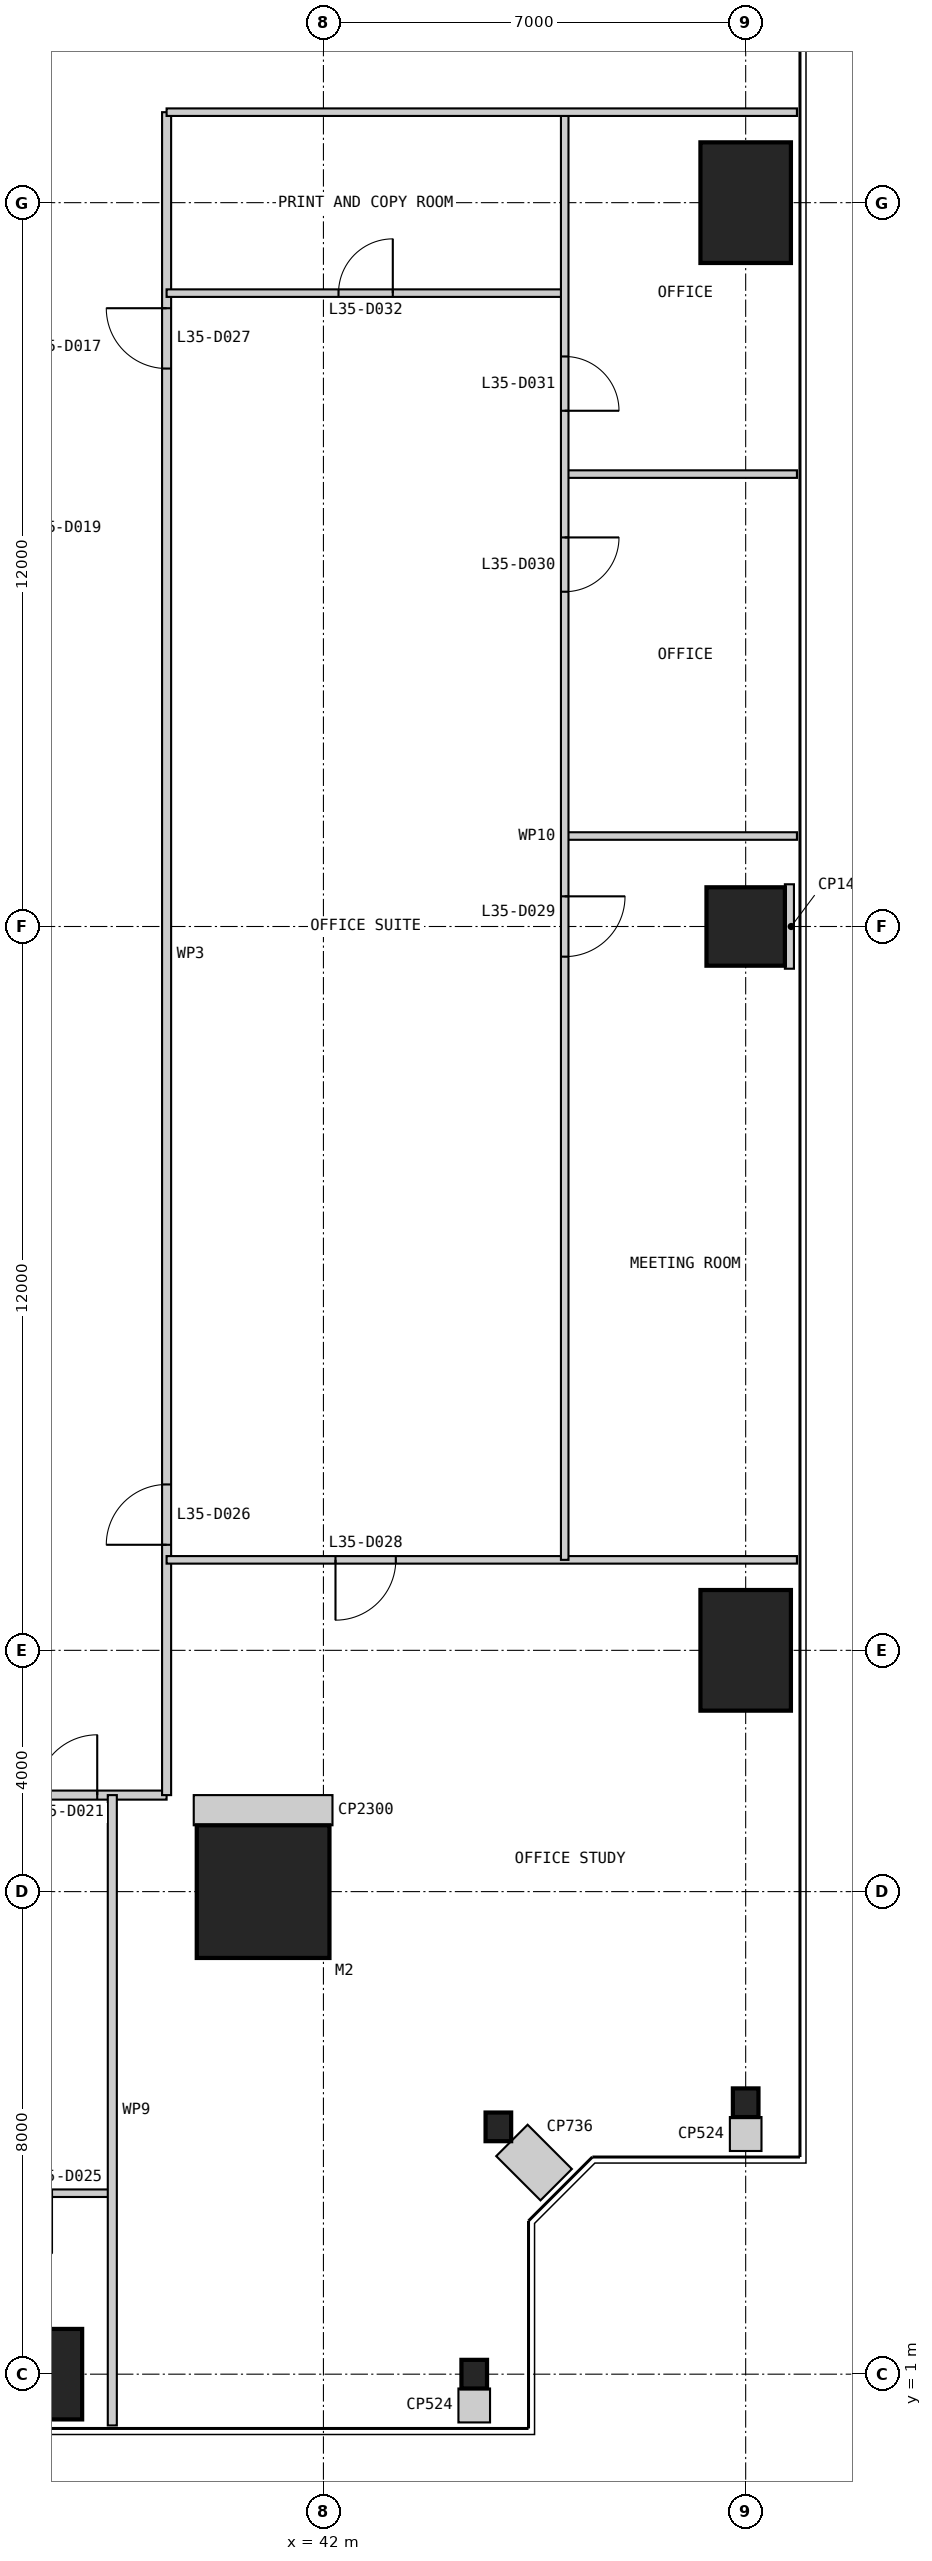
"""IFC4 building model, lengths in metres.
Left out: names, types, materials, properties, quantities, classifications, styles, units other than length and angle.
Written with IfcOpenShell. Run it as: python <this file> out.ifc"""

import sys

from ifc_helpers import new_model, si_unit, direction, frame, frame_2d, origin, origin_2d, place, context, subcontext, project, spatial, rectangle, i_section, extrude, element, fill, save


model = new_model("IFC4")
c1 = context("Model", 3, precision=1e-05, world=origin(), true_north=direction((0.0, 1.0)))
c2 = subcontext(c1, "Body", "Model", "MODEL_VIEW")
j1 = project(units=[si_unit("LENGTHUNIT", "METRE"), si_unit("PLANEANGLEUNIT", "RADIAN")], contexts=[c1])
p1 = place(None, origin())
s1 = spatial("IfcSite", under=j1, at=p1, CompositionType="ELEMENT")
p2 = place(p1, origin())
s2 = spatial("IfcBuilding", under=s1, at=p2, CompositionType="ELEMENT")
p3 = place(p2, frame((0.0, 0.0, 150.4)))
s3 = spatial("IfcBuildingStorey", under=s2, at=p3, CompositionType="ELEMENT", Elevation=150.4)
p4 = place(p3, frame((41.0, 9.0, 0.0), z_axis=(0.0, 0.0, 1.0), x_axis=(1.0, 0.0, 0.0)))
e1 = element("IfcColumn", 1, at=p4, inside=s3, PredefinedType="COLUMN", context=c2, shape_type="SweptSolid", body=[
    extrude(rectangle(XDim=2.2, YDim=2.2, at=origin_2d()), origin(), (0.0, 0.0, 1.0), 4.0),
])
p5 = place(p3, frame((37.0, 1.0, 0.0), z_axis=(0.0, 0.0, 1.0), x_axis=(1.0, 0.0, 0.0)))
e2 = element("IfcColumn", 2, at=p5, inside=s3, PredefinedType="COLUMN", context=c2, shape_type="SweptSolid", body=[
    extrude(rectangle(XDim=2.0, YDim=1.5, at=origin_2d()), origin(), (0.0, 0.0, 1.0), 4.0),
])
for number, where, z_axis, x_axis in (
    (3, (44.5, 1.0, 0.0), (0.0, 0.0, 1.0), (1.0, 0.0, 0.0)),
    (4, (44.9, 5.1, 0.0), (0.0, 0.0, 1.0), (1.0, 0.0, 0.0)),
    (5, (49.0, 5.5, 0.0), (0.0, 0.0, 1.0), (1.0, 0.0, 0.0)),
):
    element("IfcColumn", number, at=place(p3, frame(where, z_axis=z_axis, x_axis=x_axis)), inside=s3, PredefinedType="COLUMN", context=c2, shape_type="SweptSolid", body=[
        extrude(i_section(OverallWidth=0.424, OverallDepth=0.475, WebThickness=0.048, FlangeThickness=0.077, at=origin_2d()), origin(), (0.0, 0.0, 1.0), 4.0),
    ])
p6 = place(p3, frame((49.0, 13.0, 0.0), z_axis=(0.0, 0.0, 1.0), x_axis=(1.0, 0.0, 0.0)))
e6 = element("IfcColumn", 6, at=p6, inside=s3, PredefinedType="COLUMN", context=c2, shape_type="SweptSolid", body=[
    extrude(rectangle(XDim=1.5, YDim=2.0, at=origin_2d()), origin(), (0.0, 0.0, 1.0), 4.0),
])
p7 = place(p3, frame((49.0, 25.0, 0.0), z_axis=(0.0, 0.0, 1.0), x_axis=(1.0, 0.0, 0.0)))
e7 = element("IfcColumn", 7, at=p7, inside=s3, PredefinedType="COLUMN", context=c2, shape_type="SweptSolid", body=[
    extrude(rectangle(XDim=1.3, YDim=1.3, at=origin_2d()), origin(), (0.0, 0.0, 1.0), 4.0),
])
p8 = place(p3, frame((49.0, 37.0, 0.0), z_axis=(0.0, 0.0, 1.0), x_axis=(1.0, 0.0, 0.0)))
e8 = element("IfcColumn", 8, at=p8, inside=s3, PredefinedType="COLUMN", context=c2, shape_type="SweptSolid", body=[
    extrude(rectangle(XDim=1.5, YDim=2.0, at=origin_2d()), origin(), (0.0, 0.0, 1.0), 4.0),
])
p9 = place(p3, frame((10.6, 10.6, 0.0), z_axis=(0.0, 0.0, 1.0), x_axis=(1.0, 0.0, 0.0)))
e9 = element("IfcWall", 9, at=p9, inside=s3, PredefinedType="PARTITIONING", context=c2, shape_type="SweptSolid", body=[
    extrude(rectangle(XDim=28.8, YDim=0.15, at=frame_2d((14.4, 0.0))), origin(), (0.0, 0.0, 1.0), 3.85),
])
p10 = place(p9, frame((4.15, 0.0, 0.0)))
e10 = element("IfcOpeningElement", 10, at=p10, cuts=e9, PredefinedType="OPENING", context=c2, shape_type="SweptSolid", body=[
    extrude(rectangle(XDim=1.0, YDim=2.2, at=frame_2d((0.5, 1.1))), frame((0.0, 0.085, 0.0), z_axis=(0.0, -1.0, 0.0), x_axis=(1.0, 0.0, 0.0)), (0.0, 0.0, 1.0), 0.17),
])
p11 = place(p9, frame((26.65, 0.0, 0.0)))
e11 = element("IfcOpeningElement", 11, at=p11, cuts=e9, PredefinedType="OPENING", context=c2, shape_type="SweptSolid", body=[
    extrude(rectangle(XDim=1.0, YDim=2.2, at=frame_2d((0.5, 1.1))), frame((0.0, 0.085, 0.0), z_axis=(0.0, -1.0, 0.0), x_axis=(1.0, 0.0, 0.0)), (0.0, 0.0, 1.0), 0.17),
])
p12 = place(p3, frame((14.5, 4.0, 0.0), z_axis=(0.0, 0.0, 1.0), x_axis=(1.0, 0.0, 0.0)))
e12 = element("IfcWall", 12, at=p12, inside=s3, PredefinedType="PARTITIONING", context=c2, shape_type="SweptSolid", body=[
    extrude(rectangle(XDim=24.0, YDim=0.125, at=frame_2d((12.0, 0.0))), origin(), (0.0, 0.0, 1.0), 3.85),
])
p13 = place(p12, frame((4.05, 0.0, 0.0)))
e13 = element("IfcOpeningElement", 13, at=p13, cuts=e12, PredefinedType="OPENING", context=c2, shape_type="SweptSolid", body=[
    extrude(rectangle(XDim=0.9, YDim=2.2, at=frame_2d((0.45, 1.1))), frame((0.0, 0.073, 0.0), z_axis=(0.0, -1.0, 0.0), x_axis=(1.0, 0.0, 0.0)), (0.0, 0.0, 1.0), 0.145),
])
p14 = place(p12, frame((10.05, 0.0, 0.0)))
e14 = element("IfcOpeningElement", 14, at=p14, cuts=e12, PredefinedType="OPENING", context=c2, shape_type="SweptSolid", body=[
    extrude(rectangle(XDim=0.9, YDim=2.2, at=frame_2d((0.45, 1.1))), frame((0.0, 0.073, 0.0), z_axis=(0.0, -1.0, 0.0), x_axis=(1.0, 0.0, 0.0)), (0.0, 0.0, 1.0), 0.145),
])
p15 = place(p12, frame((22.0, 0.0, 0.0)))
e15 = element("IfcOpeningElement", 15, at=p15, cuts=e12, PredefinedType="OPENING", context=c2, shape_type="SweptSolid", body=[
    extrude(rectangle(XDim=1.0, YDim=2.2, at=frame_2d((0.5, 1.1))), frame((0.0, 0.073, 0.0), z_axis=(0.0, -1.0, 0.0), x_axis=(1.0, 0.0, 0.0)), (0.0, 0.0, 1.0), 0.145),
])
p16 = place(p3, frame((39.4, 10.6, 0.0), z_axis=(0.0, 0.0, 1.0), x_axis=(0.0, 1.0, 0.0)))
e16 = element("IfcWall", 16, at=p16, inside=s3, PredefinedType="PARTITIONING", context=c2, shape_type="SweptSolid", body=[
    extrude(rectangle(XDim=27.9, YDim=0.15, at=frame_2d((13.95, 0.0))), origin(), (0.0, 0.0, 1.0), 3.85),
])
p17 = place(p16, frame((4.15, 0.0, 0.0)))
e17 = element("IfcOpeningElement", 17, at=p17, cuts=e16, PredefinedType="OPENING", context=c2, shape_type="SweptSolid", body=[
    extrude(rectangle(XDim=1.0, YDim=2.2, at=frame_2d((0.5, 1.1))), frame((0.0, 0.085, 0.0), z_axis=(0.0, -1.0, 0.0), x_axis=(1.0, 0.0, 0.0)), (0.0, 0.0, 1.0), 0.17),
])
p18 = place(p16, frame((23.65, 0.0, 0.0)))
e18 = element("IfcOpeningElement", 18, at=p18, cuts=e16, PredefinedType="OPENING", context=c2, shape_type="SweptSolid", body=[
    extrude(rectangle(XDim=1.0, YDim=2.2, at=frame_2d((0.5, 1.1))), frame((0.0, 0.085, 0.0), z_axis=(0.0, -1.0, 0.0), x_axis=(1.0, 0.0, 0.0)), (0.0, 0.0, 1.0), 0.17),
])
p19 = place(p3, frame((38.5, 0.15, 0.0), z_axis=(0.0, 0.0, 1.0), x_axis=(0.0, 1.0, 0.0)))
e19 = element("IfcWall", 19, at=p19, inside=s3, PredefinedType="PARTITIONING", context=c2, shape_type="SweptSolid", body=[
    extrude(rectangle(XDim=10.45, YDim=0.15, at=frame_2d((5.225, 0.0))), origin(), (0.0, 0.0, 1.0), 3.85),
])
p20 = place(p3, frame((49.85, 14.5, 0.0), z_axis=(0.0, 0.0, 1.0), x_axis=(-1.0, 0.0, 0.0)))
e20 = element("IfcWall", 20, at=p20, inside=s3, PredefinedType="PARTITIONING", context=c2, shape_type="SweptSolid", body=[
    extrude(rectangle(XDim=10.45, YDim=0.125, at=frame_2d((5.225, 0.0))), origin(), (0.0, 0.0, 1.0), 3.85),
])
p21 = place(p20, frame((6.65, 0.0, 0.0)))
e21 = element("IfcOpeningElement", 21, at=p21, cuts=e20, PredefinedType="OPENING", context=c2, shape_type="SweptSolid", body=[
    extrude(rectangle(XDim=1.0, YDim=2.2, at=frame_2d((0.5, 1.1))), frame((0.0, 0.073, 0.0), z_axis=(0.0, -1.0, 0.0), x_axis=(1.0, 0.0, 0.0)), (0.0, 0.0, 1.0), 0.145),
])
for number, where, z_axis, x_axis in (
    (22, (49.85, 26.5, 0.0), (0.0, 0.0, 1.0), (-1.0, 0.0, 0.0)),
    (23, (49.85, 32.5, 0.0), (0.0, 0.0, 1.0), (-1.0, 0.0, 0.0)),
):
    element("IfcWall", number, at=place(p3, frame(where, z_axis=z_axis, x_axis=x_axis)), inside=s3, PredefinedType="PARTITIONING", context=c2, shape_type="SweptSolid", body=[
        extrude(rectangle(XDim=3.85, YDim=0.125, at=frame_2d((1.925, 0.0))), origin(), (0.0, 0.0, 1.0), 3.85),
    ])
p22 = place(p3, frame((46.0, 35.5, 0.0), z_axis=(0.0, 0.0, 1.0), x_axis=(-1.0, 0.0, 0.0)))
e24 = element("IfcWall", 24, at=p22, inside=s3, PredefinedType="PARTITIONING", context=c2, shape_type="SweptSolid", body=[
    extrude(rectangle(XDim=6.6, YDim=0.125, at=frame_2d((3.3, 0.0))), origin(), (0.0, 0.0, 1.0), 3.85),
])
p23 = place(p22, frame((2.85, 0.0, 0.0)))
e25 = element("IfcOpeningElement", 25, at=p23, cuts=e24, PredefinedType="OPENING", context=c2, shape_type="SweptSolid", body=[
    extrude(rectangle(XDim=0.9, YDim=2.2, at=frame_2d((0.45, 1.1))), frame((0.0, 0.073, 0.0), z_axis=(0.0, -1.0, 0.0), x_axis=(1.0, 0.0, 0.0)), (0.0, 0.0, 1.0), 0.145),
])
p24 = place(p3, frame((46.0, 14.5, 0.0), z_axis=(0.0, 0.0, 1.0), x_axis=(0.0, 1.0, 0.0)))
e26 = element("IfcWall", 26, at=p24, inside=s3, PredefinedType="PARTITIONING", context=c2, shape_type="SweptSolid", body=[
    extrude(rectangle(XDim=24.0, YDim=0.125, at=frame_2d((12.0, 0.0))), origin(), (0.0, 0.0, 1.0), 3.238),
])
p25 = place(p24, frame((10.0, 0.0, 0.0)))
e27 = element("IfcOpeningElement", 27, at=p25, cuts=e26, PredefinedType="OPENING", context=c2, shape_type="SweptSolid", body=[
    extrude(rectangle(XDim=1.0, YDim=2.2, at=frame_2d((0.5, 1.1))), frame((0.0, 0.073, 0.0), z_axis=(0.0, -1.0, 0.0), x_axis=(1.0, 0.0, 0.0)), (0.0, 0.0, 1.0), 0.145),
])
p26 = place(p24, frame((16.05, 0.0, 0.0)))
e28 = element("IfcOpeningElement", 28, at=p26, cuts=e26, PredefinedType="OPENING", context=c2, shape_type="SweptSolid", body=[
    extrude(rectangle(XDim=0.9, YDim=2.2, at=frame_2d((0.45, 1.1))), frame((0.0, 0.073, 0.0), z_axis=(0.0, -1.0, 0.0), x_axis=(1.0, 0.0, 0.0)), (0.0, 0.0, 1.0), 0.145),
])
p27 = place(p24, frame((19.05, 0.0, 0.0)))
e29 = element("IfcOpeningElement", 29, at=p27, cuts=e26, PredefinedType="OPENING", context=c2, shape_type="SweptSolid", body=[
    extrude(rectangle(XDim=0.9, YDim=2.2, at=frame_2d((0.45, 1.1))), frame((0.0, 0.073, 0.0), z_axis=(0.0, -1.0, 0.0), x_axis=(1.0, 0.0, 0.0)), (0.0, 0.0, 1.0), 0.145),
])
p28 = place(p3, frame((49.85, 38.5, 0.0), z_axis=(0.0, 0.0, 1.0), x_axis=(-1.0, 0.0, 0.0)))
e30 = element("IfcWall", 30, at=p28, inside=s3, PredefinedType="PARTITIONING", context=c2, shape_type="SweptSolid", body=[
    extrude(rectangle(XDim=10.45, YDim=0.125, at=frame_2d((5.225, 0.0))), origin(), (0.0, 0.0, 1.0), 3.85),
])
p29 = place(p3, frame((41.0, 10.6, 0.0), z_axis=(0.0, 0.0, 1.0), x_axis=(0.0, -1.0, 0.0)))
e31 = element("IfcWall", 31, at=p29, inside=s3, PredefinedType="PARTITIONING", context=c2, shape_type="SweptSolid", body=[
    extrude(rectangle(XDim=0.5, YDim=2.3, at=frame_2d((0.25, 0.0))), origin(), (0.0, 0.0, 1.0), 3.85),
])
p30 = place(p3, frame((44.5, 0.2, 0.0), z_axis=(0.0, 0.0, 1.0), x_axis=(0.0, 1.0, 0.0)))
e32 = element("IfcWall", 32, at=p30, inside=s3, PredefinedType="PARTITIONING", context=c2, shape_type="SweptSolid", body=[
    extrude(rectangle(XDim=0.562, YDim=0.524, at=frame_2d((0.281, 0.0))), origin(), (0.0, 0.0, 1.0), 3.85),
])
p31 = place(p3, frame((45.859, 4.141, 0.0), z_axis=(0.0, 0.0, 1.0), x_axis=(-0.707106781187, 0.707106781187, 0.0)))
e33 = element("IfcWall", 33, at=p31, inside=s3, PredefinedType="PARTITIONING", context=c2, shape_type="SweptSolid", body=[
    extrude(rectangle(XDim=1.038, YDim=0.736, at=frame_2d((0.519, 0.0))), origin(), (0.0, 0.0, 1.0), 3.85),
])
p32 = place(p3, frame((49.0, 4.7, 0.0), z_axis=(0.0, 0.0, 1.0), x_axis=(0.0, 1.0, 0.0)))
e34 = element("IfcWall", 34, at=p32, inside=s3, PredefinedType="PARTITIONING", context=c2, shape_type="SweptSolid", body=[
    extrude(rectangle(XDim=0.562, YDim=0.524, at=frame_2d((0.281, 0.0))), origin(), (0.0, 0.0, 1.0), 3.85),
])
p33 = place(p3, frame((49.8, 25.0, 0.0), z_axis=(0.0, 0.0, 1.0), x_axis=(-1.0, 0.0, 0.0)))
e35 = element("IfcWall", 35, at=p33, inside=s3, PredefinedType="PARTITIONING", context=c2, shape_type="SweptSolid", body=[
    extrude(rectangle(XDim=0.15, YDim=1.4, at=frame_2d((0.075, 0.0))), origin(), (0.0, 0.0, 1.0), 3.85),
])
p34 = place(p11, origin())
e36 = element("IfcDoor", 36, at=p34, inside=s3, OperationType="SINGLE_SWING_RIGHT", PredefinedType="DOOR", context=c2, shape_type="SweptSolid", body=[
    extrude(rectangle(XDim=1.0, YDim=2.2, at=frame_2d((0.5, 1.1))), frame((0.0, 0.025, 0.0), z_axis=(0.0, -1.0, 0.0), x_axis=(1.0, 0.0, 0.0)), (0.0, 0.0, 1.0), 0.05),
])
fill(e11, e36)
p35 = place(p17, origin())
e37 = element("IfcDoor", 37, at=p35, inside=s3, OperationType="SINGLE_SWING_LEFT", PredefinedType="DOOR", context=c2, shape_type="SweptSolid", body=[
    extrude(rectangle(XDim=1.0, YDim=2.2, at=frame_2d((0.5, 1.1))), frame((0.0, 0.025, 0.0), z_axis=(0.0, -1.0, 0.0), x_axis=(1.0, 0.0, 0.0)), (0.0, 0.0, 1.0), 0.05),
])
fill(e17, e37)
p36 = place(p18, origin())
e38 = element("IfcDoor", 38, at=p36, inside=s3, OperationType="SINGLE_SWING_RIGHT", PredefinedType="DOOR", context=c2, shape_type="SweptSolid", body=[
    extrude(rectangle(XDim=1.0, YDim=2.2, at=frame_2d((0.5, 1.1))), frame((0.0, 0.025, 0.0), z_axis=(0.0, -1.0, 0.0), x_axis=(1.0, 0.0, 0.0)), (0.0, 0.0, 1.0), 0.05),
])
fill(e18, e38)
p37 = place(p21, origin())
e39 = element("IfcDoor", 39, at=p37, inside=s3, OperationType="SINGLE_SWING_RIGHT", PredefinedType="DOOR", context=c2, shape_type="SweptSolid", body=[
    extrude(rectangle(XDim=1.0, YDim=2.2, at=frame_2d((0.5, 1.1))), frame((0.0, 0.025, 0.0), z_axis=(0.0, -1.0, 0.0), x_axis=(1.0, 0.0, 0.0)), (0.0, 0.0, 1.0), 0.05),
])
fill(e21, e39)
p38 = place(p25, frame((1.0, 0.0, 0.0), z_axis=(0.0, 0.0, 1.0), x_axis=(-1.0, 0.0, 0.0)))
e40 = element("IfcDoor", 40, at=p38, inside=s3, OperationType="SINGLE_SWING_LEFT", PredefinedType="DOOR", context=c2, shape_type="SweptSolid", body=[
    extrude(rectangle(XDim=1.0, YDim=2.2, at=frame_2d((0.5, 1.1))), frame((0.0, 0.025, 0.0), z_axis=(0.0, -1.0, 0.0), x_axis=(1.0, 0.0, 0.0)), (0.0, 0.0, 1.0), 0.05),
])
fill(e27, e40)
p39 = place(p26, frame((0.9, 0.0, 0.0), z_axis=(0.0, 0.0, 1.0), x_axis=(-1.0, 0.0, 0.0)))
e41 = element("IfcDoor", 41, at=p39, inside=s3, OperationType="SINGLE_SWING_LEFT", PredefinedType="DOOR", context=c2, shape_type="SweptSolid", body=[
    extrude(rectangle(XDim=0.9, YDim=2.2, at=frame_2d((0.45, 1.1))), frame((0.0, 0.025, 0.0), z_axis=(0.0, -1.0, 0.0), x_axis=(1.0, 0.0, 0.0)), (0.0, 0.0, 1.0), 0.05),
])
fill(e28, e41)
p40 = place(p27, frame((0.9, 0.0, 0.0), z_axis=(0.0, 0.0, 1.0), x_axis=(-1.0, 0.0, 0.0)))
e42 = element("IfcDoor", 42, at=p40, inside=s3, OperationType="SINGLE_SWING_RIGHT", PredefinedType="DOOR", context=c2, shape_type="SweptSolid", body=[
    extrude(rectangle(XDim=0.9, YDim=2.2, at=frame_2d((0.45, 1.1))), frame((0.0, 0.025, 0.0), z_axis=(0.0, -1.0, 0.0), x_axis=(1.0, 0.0, 0.0)), (0.0, 0.0, 1.0), 0.05),
])
fill(e29, e42)
p41 = place(p23, frame((0.9, 0.0, 0.0), z_axis=(0.0, 0.0, 1.0), x_axis=(-1.0, 0.0, 0.0)))
e43 = element("IfcDoor", 43, at=p41, inside=s3, OperationType="SINGLE_SWING_RIGHT", PredefinedType="DOOR", context=c2, shape_type="SweptSolid", body=[
    extrude(rectangle(XDim=0.9, YDim=2.2, at=frame_2d((0.45, 1.1))), frame((0.0, 0.025, 0.0), z_axis=(0.0, -1.0, 0.0), x_axis=(1.0, 0.0, 0.0)), (0.0, 0.0, 1.0), 0.05),
])
fill(e25, e43)
save(model, sys.argv[1])
